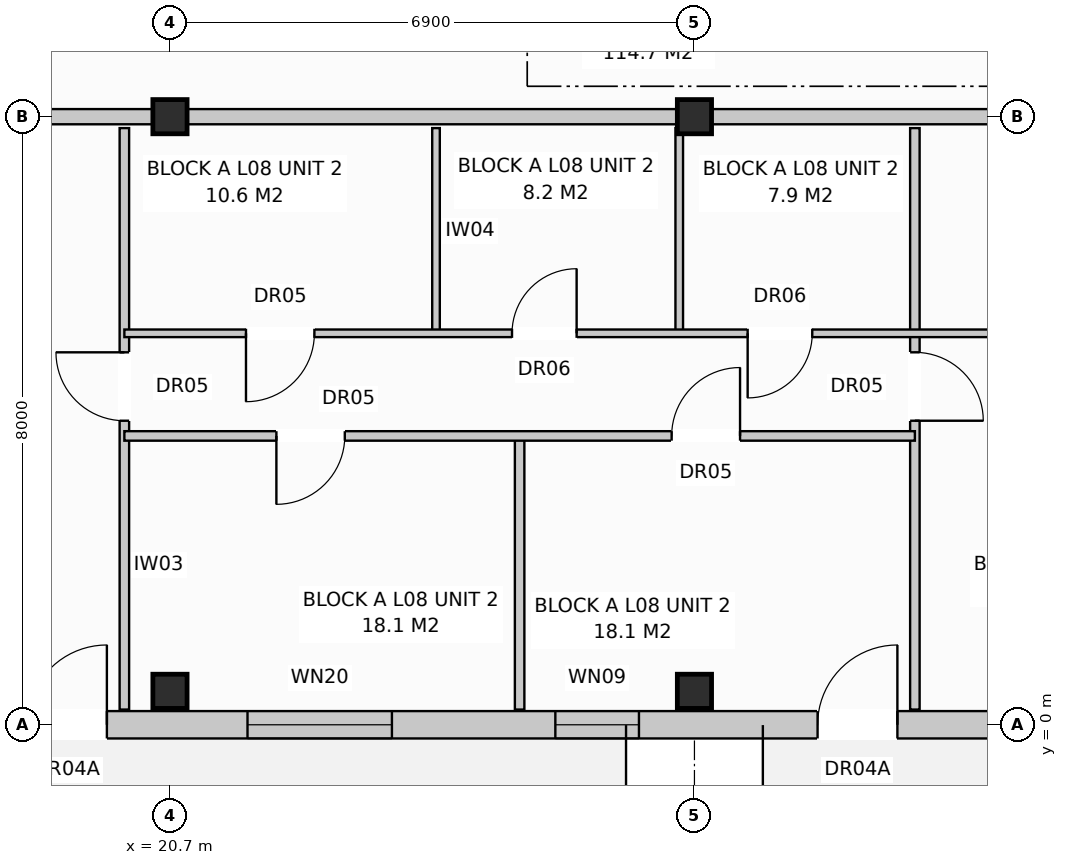
"""IFC4 building model, lengths in metres.
Left out: names, types, materials, properties, quantities, classifications, styles, units other than length and angle.
Written with IfcOpenShell. Run it as: python <this file> out.ifc"""

import sys

from ifc_helpers import new_model, si_unit, direction, frame, frame_2d, origin, origin_with_axes, origin_2d, place, context, subcontext, project, spatial, rectangle, extrude, element, fill, save


model = new_model("IFC4")
c1 = context("Model", 3, precision=1e-05, world=origin(), true_north=direction((0.0, 1.0)))
c2 = subcontext(c1, "Body", "Model", "MODEL_VIEW")
j1 = project(units=[si_unit("LENGTHUNIT", "METRE"), si_unit("PLANEANGLEUNIT", "RADIAN")], contexts=[c1])
p1 = place(None, origin())
s1 = spatial("IfcSite", under=j1, at=p1, CompositionType="ELEMENT")
p2 = place(p1, origin())
s2 = spatial("IfcBuilding", under=s1, at=p2, CompositionType="ELEMENT")
p3 = place(p2, frame((0.0, 0.0, 27.2)))
s3 = spatial("IfcBuildingStorey", under=s2, at=p3, CompositionType="ELEMENT", Elevation=27.2)
for number, where, z_axis, x_axis in (
    (1, (20.7, 0.44, 0.0), (0.0, 0.0, 1.0), (1.0, 0.0, 0.0)),
    (2, (20.7, 8.0, 0.0), (0.0, 0.0, 1.0), (1.0, 0.0, 0.0)),
    (3, (27.6, 0.44, 0.0), (0.0, 0.0, 1.0), (1.0, 0.0, 0.0)),
    (4, (27.6, 8.0, 0.0), (0.0, 0.0, 1.0), (1.0, 0.0, 0.0)),
):
    element("IfcColumn", number, at=place(p3, frame(where, z_axis=z_axis, x_axis=x_axis)), inside=s3, PredefinedType="COLUMN", context=c2, shape_type="SweptSolid", body=[
        extrude(rectangle(XDim=0.45, YDim=0.45, at=origin_2d()), origin(), (0.0, 0.0, 1.0), 3.2),
    ])
p4 = place(p3, frame((0.17, 0.0, 0.0), z_axis=(0.0, 0.0, 1.0), x_axis=(1.0, 0.0, 0.0)))
e5 = element("IfcWall", 5, at=p4, inside=s3, PredefinedType="STANDARD", context=c2, shape_type="SweptSolid", body=[
    extrude(rectangle(XDim=54.86, YDim=0.36, at=frame_2d((27.43, 0.0))), origin(), (0.0, 0.0, 1.0), 2.96),
])
p5 = place(p4, frame((3.75, 0.0, 0.0)))
e6 = element("IfcOpeningElement", 6, at=p5, cuts=e5, PredefinedType="OPENING", context=c2, shape_type="SweptSolid", body=[
    extrude(rectangle(XDim=1.05, YDim=2.12, at=frame_2d((0.525, 1.06))), frame((0.0, 0.192, 0.0), z_axis=(0.0, -1.0, 0.0), x_axis=(1.0, 0.0, 0.0)), (0.0, 0.0, 1.0), 0.384),
])
p6 = place(p4, frame((18.65, 0.0, 0.0)))
e7 = element("IfcOpeningElement", 7, at=p6, cuts=e5, PredefinedType="OPENING", context=c2, shape_type="SweptSolid", body=[
    extrude(rectangle(XDim=1.05, YDim=2.12, at=frame_2d((0.525, 1.06))), frame((0.0, 0.192, 0.0), z_axis=(0.0, -1.0, 0.0), x_axis=(1.0, 0.0, 0.0)), (0.0, 0.0, 1.0), 0.384),
])
p7 = place(p4, frame((29.05, 0.0, 0.0)))
e8 = element("IfcOpeningElement", 8, at=p7, cuts=e5, PredefinedType="OPENING", context=c2, shape_type="SweptSolid", body=[
    extrude(rectangle(XDim=1.05, YDim=2.12, at=frame_2d((0.525, 1.06))), frame((0.0, 0.192, 0.0), z_axis=(0.0, -1.0, 0.0), x_axis=(1.0, 0.0, 0.0)), (0.0, 0.0, 1.0), 0.384),
])
p8 = place(p4, frame((46.447, 0.0, 0.0)))
e9 = element("IfcOpeningElement", 9, at=p8, cuts=e5, PredefinedType="OPENING", context=c2, shape_type="SweptSolid", body=[
    extrude(rectangle(XDim=1.05, YDim=2.12, at=frame_2d((0.525, 1.06))), frame((0.0, 0.192, 0.0), z_axis=(0.0, -1.0, 0.0), x_axis=(1.0, 0.0, 0.0)), (0.0, 0.0, 1.0), 0.384),
])
p9 = place(p4, frame((1.6, 0.0, 0.8)))
e10 = element("IfcOpeningElement", 10, at=p9, cuts=e5, PredefinedType="OPENING", context=c2, shape_type="SweptSolid", body=[
    extrude(rectangle(XDim=1.8, YDim=1.7, at=frame_2d((0.9, 0.85))), frame((0.0, 0.192, 0.0), z_axis=(0.0, -1.0, 0.0), x_axis=(1.0, 0.0, 0.0)), (0.0, 0.0, 1.0), 0.384),
])
p10 = place(p4, frame((7.232, 0.0, 0.72)))
e11 = element("IfcOpeningElement", 11, at=p10, cuts=e5, PredefinedType="OPENING", context=c2, shape_type="SweptSolid", body=[
    extrude(rectangle(XDim=1.9, YDim=1.85, at=frame_2d((0.95, 0.925))), frame((0.0, 0.192, 0.0), z_axis=(0.0, -1.0, 0.0), x_axis=(1.0, 0.0, 0.0)), (0.0, 0.0, 1.0), 0.384),
])
p11 = place(p4, frame((10.85, 0.0, 0.72)))
e12 = element("IfcOpeningElement", 12, at=p11, cuts=e5, PredefinedType="OPENING", context=c2, shape_type="SweptSolid", body=[
    extrude(rectangle(XDim=1.1, YDim=1.5, at=frame_2d((0.55, 0.75))), frame((0.0, 0.192, 0.0), z_axis=(0.0, -1.0, 0.0), x_axis=(1.0, 0.0, 0.0)), (0.0, 0.0, 1.0), 0.384),
])
p12 = place(p4, frame((15.9, 0.0, 0.8)))
e13 = element("IfcOpeningElement", 13, at=p12, cuts=e5, PredefinedType="OPENING", context=c2, shape_type="SweptSolid", body=[
    extrude(rectangle(XDim=1.8, YDim=1.7, at=frame_2d((0.9, 0.85))), frame((0.0, 0.192, 0.0), z_axis=(0.0, -1.0, 0.0), x_axis=(1.0, 0.0, 0.0)), (0.0, 0.0, 1.0), 0.384),
])
p13 = place(p4, frame((21.55, 0.0, 0.72)))
e14 = element("IfcOpeningElement", 14, at=p13, cuts=e5, PredefinedType="OPENING", context=c2, shape_type="SweptSolid", body=[
    extrude(rectangle(XDim=1.9, YDim=1.85, at=frame_2d((0.95, 0.925))), frame((0.0, 0.192, 0.0), z_axis=(0.0, -1.0, 0.0), x_axis=(1.0, 0.0, 0.0)), (0.0, 0.0, 1.0), 0.384),
])
p14 = place(p4, frame((25.6, 0.0, 0.72)))
e15 = element("IfcOpeningElement", 15, at=p14, cuts=e5, PredefinedType="OPENING", context=c2, shape_type="SweptSolid", body=[
    extrude(rectangle(XDim=1.1, YDim=1.5, at=frame_2d((0.55, 0.75))), frame((0.0, 0.192, 0.0), z_axis=(0.0, -1.0, 0.0), x_axis=(1.0, 0.0, 0.0)), (0.0, 0.0, 1.0), 0.384),
])
p15 = place(p4, frame((31.4, 0.0, 0.8)))
e16 = element("IfcOpeningElement", 16, at=p15, cuts=e5, PredefinedType="OPENING", context=c2, shape_type="SweptSolid", body=[
    extrude(rectangle(XDim=1.8, YDim=1.7, at=frame_2d((0.9, 0.85))), frame((0.0, 0.192, 0.0), z_axis=(0.0, -1.0, 0.0), x_axis=(1.0, 0.0, 0.0)), (0.0, 0.0, 1.0), 0.384),
])
p16 = place(p4, frame((35.55, 0.0, 0.72)))
e17 = element("IfcOpeningElement", 17, at=p16, cuts=e5, PredefinedType="OPENING", context=c2, shape_type="SweptSolid", body=[
    extrude(rectangle(XDim=1.9, YDim=1.85, at=frame_2d((0.95, 0.925))), frame((0.0, 0.192, 0.0), z_axis=(0.0, -1.0, 0.0), x_axis=(1.0, 0.0, 0.0)), (0.0, 0.0, 1.0), 0.384),
])
p17 = place(p4, frame((39.25, 0.0, 0.72)))
e18 = element("IfcOpeningElement", 18, at=p17, cuts=e5, PredefinedType="OPENING", context=c2, shape_type="SweptSolid", body=[
    extrude(rectangle(XDim=1.1, YDim=1.5, at=frame_2d((0.55, 0.75))), frame((0.0, 0.192, 0.0), z_axis=(0.0, -1.0, 0.0), x_axis=(1.0, 0.0, 0.0)), (0.0, 0.0, 1.0), 0.384),
])
p18 = place(p4, frame((44.3, 0.0, 0.8)))
e19 = element("IfcOpeningElement", 19, at=p18, cuts=e5, PredefinedType="OPENING", context=c2, shape_type="SweptSolid", body=[
    extrude(rectangle(XDim=1.8, YDim=1.7, at=frame_2d((0.9, 0.85))), frame((0.0, 0.192, 0.0), z_axis=(0.0, -1.0, 0.0), x_axis=(1.0, 0.0, 0.0)), (0.0, 0.0, 1.0), 0.384),
])
p19 = place(p4, frame((49.55, 0.0, 0.72)))
e20 = element("IfcOpeningElement", 20, at=p19, cuts=e5, PredefinedType="OPENING", context=c2, shape_type="SweptSolid", body=[
    extrude(rectangle(XDim=1.1, YDim=1.5, at=frame_2d((0.55, 0.75))), frame((0.0, 0.192, 0.0), z_axis=(0.0, -1.0, 0.0), x_axis=(1.0, 0.0, 0.0)), (0.0, 0.0, 1.0), 0.384),
])
p20 = place(p4, frame((52.29, 0.0, 0.8)))
e21 = element("IfcOpeningElement", 21, at=p20, cuts=e5, PredefinedType="OPENING", context=c2, shape_type="SweptSolid", body=[
    extrude(rectangle(XDim=1.95, YDim=1.65, at=frame_2d((0.975, 0.825))), frame((0.0, 0.192, 0.0), z_axis=(0.0, -1.0, 0.0), x_axis=(1.0, 0.0, 0.0)), (0.0, 0.0, 1.0), 0.384),
])
p21 = place(p3, frame((13.8, 8.0, 0.0), z_axis=(0.0, 0.0, 1.0), x_axis=(1.0, 0.0, 0.0)))
e22 = element("IfcWall", 22, at=p21, inside=s3, PredefinedType="PARTITIONING", context=c2, shape_type="SweptSolid", body=[
    extrude(rectangle(XDim=20.7, YDim=0.2, at=frame_2d((10.35, 0.0))), origin(), (0.0, 0.0, 1.0), 2.4),
])
p22 = place(p21, frame((2.4, 0.0, 0.0)))
e23 = element("IfcOpeningElement", 23, at=p22, cuts=e22, PredefinedType="OPENING", context=c2, shape_type="SweptSolid", body=[
    extrude(rectangle(XDim=0.95, YDim=2.15, at=frame_2d((0.475, 1.075))), frame((0.0, 0.112, 0.0), z_axis=(0.0, -1.0, 0.0), x_axis=(1.0, 0.0, 0.0)), (0.0, 0.0, 1.0), 0.224),
])
p23 = place(p3, frame((20.1, 7.85, 0.0), z_axis=(0.0, 0.0, 1.0), x_axis=(0.0, -1.0, 0.0)))
e24 = element("IfcWall", 24, at=p23, inside=s3, PredefinedType="PARTITIONING", context=c2, shape_type="SweptSolid", body=[
    extrude(rectangle(XDim=7.65, YDim=0.125, at=frame_2d((3.825, 0.0))), origin(), (0.0, 0.0, 1.0), 2.96),
])
p24 = place(p23, frame((2.95, 0.0, 0.0)))
e25 = element("IfcOpeningElement", 25, at=p24, cuts=e24, PredefinedType="OPENING", context=c2, shape_type="SweptSolid", body=[
    extrude(rectangle(XDim=0.9, YDim=2.1, at=frame_2d((0.45, 1.05))), frame((0.0, 0.074, 0.0), z_axis=(0.0, -1.0, 0.0), x_axis=(1.0, 0.0, 0.0)), (0.0, 0.0, 1.0), 0.149),
])
for number, where, z_axis, x_axis in (
    (26, (24.2, 7.85, 0.0), (0.0, 0.0, 1.0), (0.0, -1.0, 0.0)),
    (27, (27.4, 7.85, 0.0), (0.0, 0.0, 1.0), (0.0, -1.0, 0.0)),
):
    element("IfcWall", number, at=place(p3, frame(where, z_axis=z_axis, x_axis=x_axis)), inside=s3, PredefinedType="PARTITIONING", context=c2, shape_type="SweptSolid", body=[
        extrude(rectangle(XDim=2.7, YDim=0.1, at=frame_2d((1.35, 0.0))), origin(), (0.0, 0.0, 1.0), 2.96),
    ])
p25 = place(p3, frame((25.3, 3.8, 0.0), z_axis=(0.0, 0.0, 1.0), x_axis=(0.0, -1.0, 0.0)))
e28 = element("IfcWall", 28, at=p25, inside=s3, PredefinedType="PARTITIONING", context=c2, shape_type="SweptSolid", body=[
    extrude(rectangle(XDim=3.6, YDim=0.125, at=frame_2d((1.8, 0.0))), origin(), (0.0, 0.0, 1.0), 2.96),
])
p26 = place(p3, frame((30.5, 7.85, 0.0), z_axis=(0.0, 0.0, 1.0), x_axis=(0.0, -1.0, 0.0)))
e29 = element("IfcWall", 29, at=p26, inside=s3, PredefinedType="PARTITIONING", context=c2, shape_type="SweptSolid", body=[
    extrude(rectangle(XDim=7.65, YDim=0.125, at=frame_2d((3.825, 0.0))), origin(), (0.0, 0.0, 1.0), 2.96),
])
p27 = place(p26, frame((2.95, 0.0, 0.0)))
e30 = element("IfcOpeningElement", 30, at=p27, cuts=e29, PredefinedType="OPENING", context=c2, shape_type="SweptSolid", body=[
    extrude(rectangle(XDim=0.9, YDim=2.1, at=frame_2d((0.45, 1.05))), frame((0.0, 0.074, 0.0), z_axis=(0.0, -1.0, 0.0), x_axis=(1.0, 0.0, 0.0)), (0.0, 0.0, 1.0), 0.149),
])
p28 = place(p3, frame((20.1, 5.15, 0.0), z_axis=(0.0, 0.0, 1.0), x_axis=(1.0, 0.0, 0.0)))
e31 = element("IfcWall", 31, at=p28, inside=s3, PredefinedType="PARTITIONING", context=c2, shape_type="SweptSolid", body=[
    extrude(rectangle(XDim=14.3, YDim=0.1, at=frame_2d((7.15, 0.0))), origin(), (0.0, 0.0, 1.0), 2.96),
])
p29 = place(p28, frame((1.6, 0.0, 0.0)))
e32 = element("IfcOpeningElement", 32, at=p29, cuts=e31, PredefinedType="OPENING", context=c2, shape_type="SweptSolid", body=[
    extrude(rectangle(XDim=0.9, YDim=2.1, at=frame_2d((0.45, 1.05))), frame((0.0, 0.062, 0.0), z_axis=(0.0, -1.0, 0.0), x_axis=(1.0, 0.0, 0.0)), (0.0, 0.0, 1.0), 0.124),
])
p30 = place(p28, frame((5.1, 0.0, 0.0)))
e33 = element("IfcOpeningElement", 33, at=p30, cuts=e31, PredefinedType="OPENING", context=c2, shape_type="SweptSolid", body=[
    extrude(rectangle(XDim=0.85, YDim=2.05, at=frame_2d((0.425, 1.025))), frame((0.0, 0.062, 0.0), z_axis=(0.0, -1.0, 0.0), x_axis=(1.0, 0.0, 0.0)), (0.0, 0.0, 1.0), 0.124),
])
p31 = place(p28, frame((8.2, 0.0, 0.0)))
e34 = element("IfcOpeningElement", 34, at=p31, cuts=e31, PredefinedType="OPENING", context=c2, shape_type="SweptSolid", body=[
    extrude(rectangle(XDim=0.85, YDim=2.05, at=frame_2d((0.425, 1.025))), frame((0.0, 0.062, 0.0), z_axis=(0.0, -1.0, 0.0), x_axis=(1.0, 0.0, 0.0)), (0.0, 0.0, 1.0), 0.124),
])
p32 = place(p28, frame((11.6, 0.0, 0.0)))
e35 = element("IfcOpeningElement", 35, at=p32, cuts=e31, PredefinedType="OPENING", context=c2, shape_type="SweptSolid", body=[
    extrude(rectangle(XDim=0.85, YDim=2.05, at=frame_2d((0.425, 1.025))), frame((0.0, 0.062, 0.0), z_axis=(0.0, -1.0, 0.0), x_axis=(1.0, 0.0, 0.0)), (0.0, 0.0, 1.0), 0.124),
])
p33 = place(p3, frame((20.1, 3.8, 0.0), z_axis=(0.0, 0.0, 1.0), x_axis=(1.0, 0.0, 0.0)))
e36 = element("IfcWall", 36, at=p33, inside=s3, PredefinedType="PARTITIONING", context=c2, shape_type="SweptSolid", body=[
    extrude(rectangle(XDim=10.4, YDim=0.125, at=frame_2d((5.2, 0.0))), origin(), (0.0, 0.0, 1.0), 2.96),
])
p34 = place(p33, frame((2.0, 0.0, 0.0)))
e37 = element("IfcOpeningElement", 37, at=p34, cuts=e36, PredefinedType="OPENING", context=c2, shape_type="SweptSolid", body=[
    extrude(rectangle(XDim=0.9, YDim=2.1, at=frame_2d((0.45, 1.05))), frame((0.0, 0.074, 0.0), z_axis=(0.0, -1.0, 0.0), x_axis=(1.0, 0.0, 0.0)), (0.0, 0.0, 1.0), 0.149),
])
p35 = place(p33, frame((7.2, 0.0, 0.0)))
e38 = element("IfcOpeningElement", 38, at=p35, cuts=e36, PredefinedType="OPENING", context=c2, shape_type="SweptSolid", body=[
    extrude(rectangle(XDim=0.9, YDim=2.1, at=frame_2d((0.45, 1.05))), frame((0.0, 0.074, 0.0), z_axis=(0.0, -1.0, 0.0), x_axis=(1.0, 0.0, 0.0)), (0.0, 0.0, 1.0), 0.149),
])
p36 = place(p6, origin_with_axes())
e39 = element("IfcDoor", 39, at=p36, inside=s3, OperationType="SINGLE_SWING_RIGHT", PredefinedType="DOOR", context=c2, shape_type="SweptSolid", body=[
    extrude(rectangle(XDim=1.05, YDim=2.12, at=frame_2d((0.525, 1.06))), frame((0.0, 0.025, 0.0), z_axis=(0.0, -1.0, 0.0), x_axis=(1.0, 0.0, 0.0)), (0.0, 0.0, 1.0), 0.05),
])
fill(e7, e39)
p37 = place(p7, origin_with_axes())
e40 = element("IfcDoor", 40, at=p37, inside=s3, OperationType="SINGLE_SWING_RIGHT", PredefinedType="DOOR", context=c2, shape_type="SweptSolid", body=[
    extrude(rectangle(XDim=1.05, YDim=2.12, at=frame_2d((0.525, 1.06))), frame((0.0, 0.025, 0.0), z_axis=(0.0, -1.0, 0.0), x_axis=(1.0, 0.0, 0.0)), (0.0, 0.0, 1.0), 0.05),
])
fill(e8, e40)
p38 = place(p13, origin_with_axes())
e41 = element("IfcWindow", 41, at=p38, inside=s3, PartitioningType="SINGLE_PANEL", PredefinedType="WINDOW", context=c2, shape_type="SweptSolid", body=[
    extrude(rectangle(XDim=1.9, YDim=1.85, at=frame_2d((0.95, 0.925))), frame((0.0, 0.03, 0.0), z_axis=(0.0, -1.0, 0.0), x_axis=(1.0, 0.0, 0.0)), (0.0, 0.0, 1.0), 0.06),
])
fill(e14, e41)
p39 = place(p14, origin_with_axes())
e42 = element("IfcWindow", 42, at=p39, inside=s3, PartitioningType="SINGLE_PANEL", PredefinedType="WINDOW", context=c2, shape_type="SweptSolid", body=[
    extrude(rectangle(XDim=1.1, YDim=1.5, at=frame_2d((0.55, 0.75))), frame((0.0, 0.03, 0.0), z_axis=(0.0, -1.0, 0.0), x_axis=(1.0, 0.0, 0.0)), (0.0, 0.0, 1.0), 0.06),
])
fill(e15, e42)
p40 = place(p24, frame((0.9, 0.0, 0.0), z_axis=(0.0, 0.0, 1.0), x_axis=(-1.0, 0.0, 0.0)))
e43 = element("IfcDoor", 43, at=p40, inside=s3, OperationType="SINGLE_SWING_LEFT", PredefinedType="DOOR", context=c2, shape_type="SweptSolid", body=[
    extrude(rectangle(XDim=0.9, YDim=2.1, at=frame_2d((0.45, 1.05))), frame((0.0, 0.025, 0.0), z_axis=(0.0, -1.0, 0.0), x_axis=(1.0, 0.0, 0.0)), (0.0, 0.0, 1.0), 0.05),
])
fill(e25, e43)
p41 = place(p27, origin_with_axes())
e44 = element("IfcDoor", 44, at=p41, inside=s3, OperationType="SINGLE_SWING_RIGHT", PredefinedType="DOOR", context=c2, shape_type="SweptSolid", body=[
    extrude(rectangle(XDim=0.9, YDim=2.1, at=frame_2d((0.45, 1.05))), frame((0.0, 0.025, 0.0), z_axis=(0.0, -1.0, 0.0), x_axis=(1.0, 0.0, 0.0)), (0.0, 0.0, 1.0), 0.05),
])
fill(e30, e44)
p42 = place(p29, frame((0.9, 0.0, 0.0), z_axis=(0.0, 0.0, 1.0), x_axis=(-1.0, 0.0, 0.0)))
e45 = element("IfcDoor", 45, at=p42, inside=s3, OperationType="SINGLE_SWING_LEFT", PredefinedType="DOOR", context=c2, shape_type="SweptSolid", body=[
    extrude(rectangle(XDim=0.9, YDim=2.1, at=frame_2d((0.45, 1.05))), frame((0.0, 0.025, 0.0), z_axis=(0.0, -1.0, 0.0), x_axis=(1.0, 0.0, 0.0)), (0.0, 0.0, 1.0), 0.05),
])
fill(e32, e45)
p43 = place(p30, origin_with_axes())
e46 = element("IfcDoor", 46, at=p43, inside=s3, OperationType="SINGLE_SWING_RIGHT", PredefinedType="DOOR", context=c2, shape_type="SweptSolid", body=[
    extrude(rectangle(XDim=0.85, YDim=2.05, at=frame_2d((0.425, 1.025))), frame((0.0, 0.025, 0.0), z_axis=(0.0, -1.0, 0.0), x_axis=(1.0, 0.0, 0.0)), (0.0, 0.0, 1.0), 0.05),
])
fill(e33, e46)
p44 = place(p31, frame((0.85, 0.0, 0.0), z_axis=(0.0, 0.0, 1.0), x_axis=(-1.0, 0.0, 0.0)))
e47 = element("IfcDoor", 47, at=p44, inside=s3, OperationType="SINGLE_SWING_LEFT", PredefinedType="DOOR", context=c2, shape_type="SweptSolid", body=[
    extrude(rectangle(XDim=0.85, YDim=2.05, at=frame_2d((0.425, 1.025))), frame((0.0, 0.025, 0.0), z_axis=(0.0, -1.0, 0.0), x_axis=(1.0, 0.0, 0.0)), (0.0, 0.0, 1.0), 0.05),
])
fill(e34, e47)
p45 = place(p34, frame((0.9, 0.0, 0.0), z_axis=(0.0, 0.0, 1.0), x_axis=(-1.0, 0.0, 0.0)))
e48 = element("IfcDoor", 48, at=p45, inside=s3, OperationType="SINGLE_SWING_LEFT", PredefinedType="DOOR", context=c2, shape_type="SweptSolid", body=[
    extrude(rectangle(XDim=0.9, YDim=2.1, at=frame_2d((0.45, 1.05))), frame((0.0, 0.025, 0.0), z_axis=(0.0, -1.0, 0.0), x_axis=(1.0, 0.0, 0.0)), (0.0, 0.0, 1.0), 0.05),
])
fill(e37, e48)
p46 = place(p35, origin_with_axes())
e49 = element("IfcDoor", 49, at=p46, inside=s3, OperationType="SINGLE_SWING_RIGHT", PredefinedType="DOOR", context=c2, shape_type="SweptSolid", body=[
    extrude(rectangle(XDim=0.9, YDim=2.1, at=frame_2d((0.45, 1.05))), frame((0.0, 0.025, 0.0), z_axis=(0.0, -1.0, 0.0), x_axis=(1.0, 0.0, 0.0)), (0.0, 0.0, 1.0), 0.05),
])
fill(e38, e49)
save(model, sys.argv[1])
